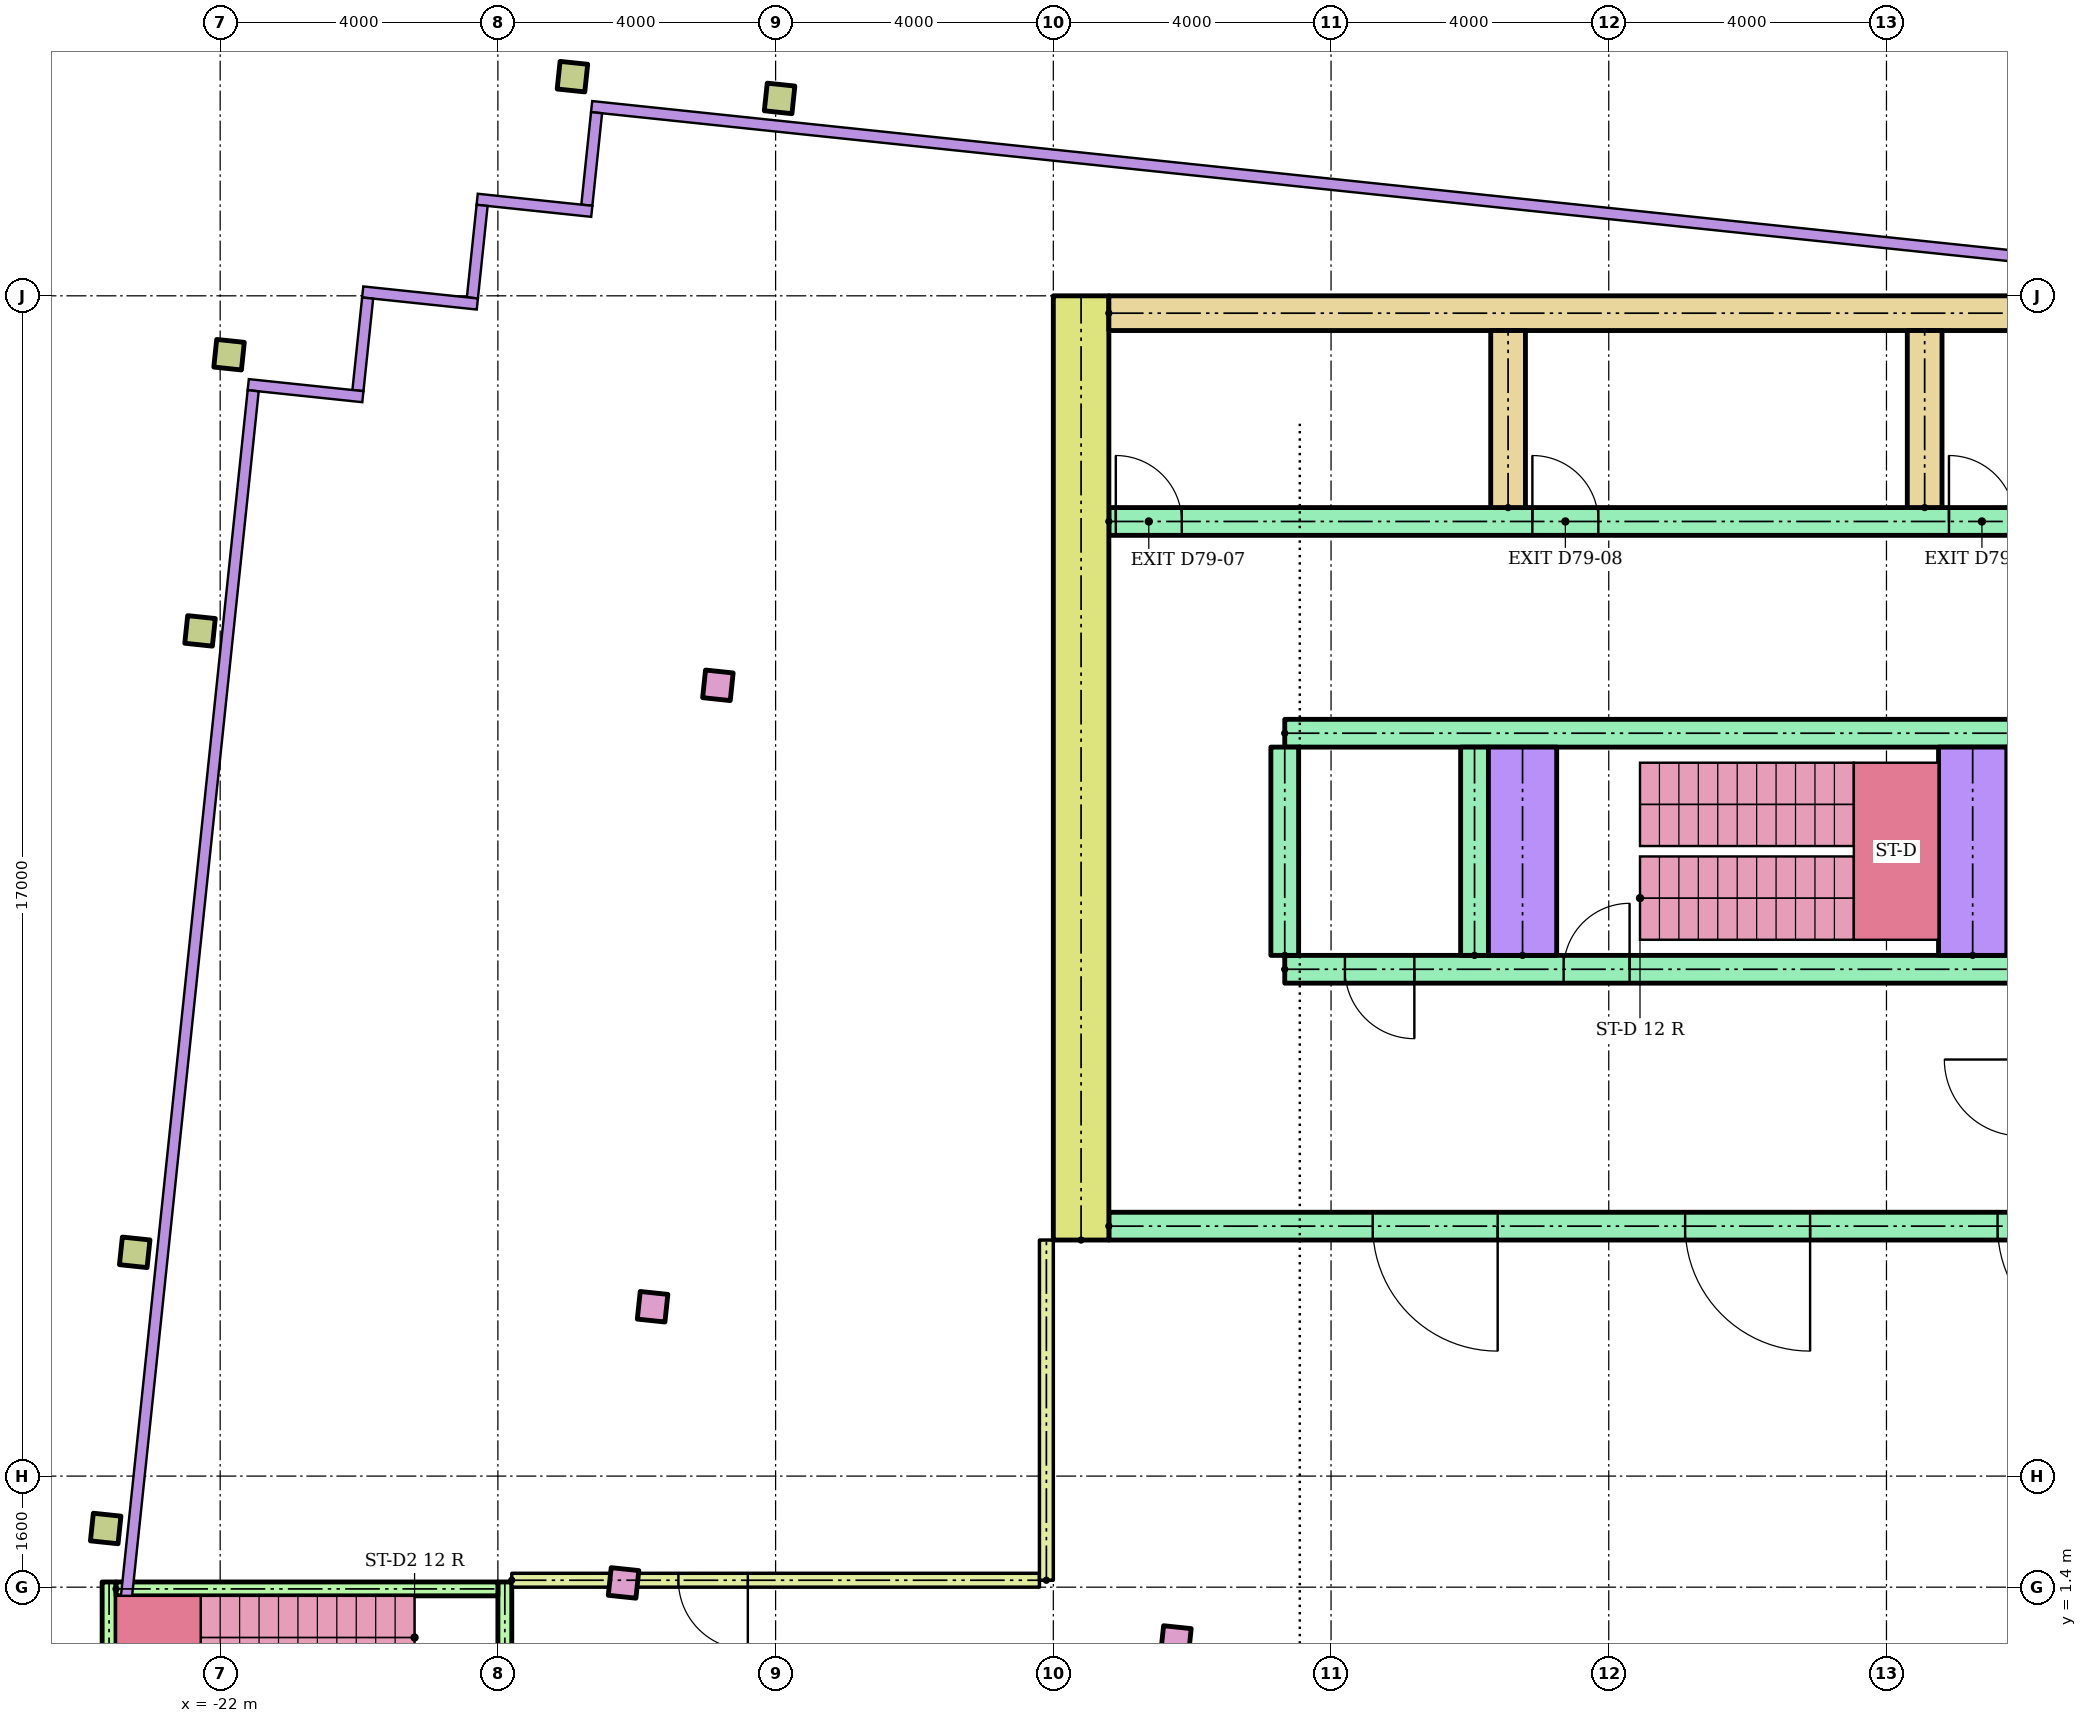
"""IFC4 building model, lengths in metres.
Left out: names, types, materials, properties, quantities, classifications, styles, units other than length and angle.
Written with IfcOpenShell. Run it as: python <this file> out.ifc"""

import sys

from ifc_helpers import new_model, si_unit, direction, frame, frame_2d, origin, origin_2d, place, context, subcontext, project, spatial, rectangle, hollow_rectangle, extrude, element, fill, save


model = new_model("IFC4")
c1 = context("Model", 3, precision=1e-05, world=origin(), true_north=direction((0.0, 1.0)))
c2 = subcontext(c1, "Body", "Model", "MODEL_VIEW")
j1 = project(units=[si_unit("LENGTHUNIT", "METRE"), si_unit("PLANEANGLEUNIT", "RADIAN")], contexts=[c1])
p1 = place(None, origin())
s1 = spatial("IfcSite", under=j1, at=p1, CompositionType="ELEMENT")
p2 = place(p1, origin())
s2 = spatial("IfcBuilding", under=s1, at=p2, CompositionType="ELEMENT")
p3 = place(p2, frame((0.0, 0.0, 309.2)))
s3 = spatial("IfcBuildingStorey", under=s2, at=p3, CompositionType="ELEMENT", Elevation=309.2)
p4 = place(p3, frame((-23.649, 2.245, 0.0), z_axis=(0.0, 0.0, 1.0), x_axis=(0.994521895368, -0.104528463268, 0.0)))
e1 = element("IfcColumn", 1, at=p4, inside=s3, PredefinedType="COLUMN", context=c2, shape_type="SweptSolid", body=[
    extrude(hollow_rectangle(XDim=0.4, YDim=0.4, WallThickness=0.02, at=origin_2d()), origin(), (0.0, 0.0, 1.0), 3.78),
])
for number, where, z_axis, x_axis in (
    (2, (-16.19, 1.461, 0.0), (0.0, 0.0, 1.0), (0.995, -0.105, 0.0)),
    (3, (-8.234, 0.625, 0.0), (0.0, 0.0, 1.0), (0.995, -0.105, 0.0)),
):
    element("IfcColumn", number, at=place(p3, frame(where, z_axis=z_axis, x_axis=x_axis)), inside=s3, PredefinedType="COLUMN", context=c2, shape_type="SweptSolid", body=[
        extrude(rectangle(XDim=0.4, YDim=0.4, at=origin_2d()), origin(), (0.0, 0.0, 1.0), 3.78),
    ])
p5 = place(p3, frame((-23.231, 6.223, 0.0), z_axis=(0.0, 0.0, 1.0), x_axis=(0.994521895368, -0.104528463268, 0.0)))
e4 = element("IfcColumn", 4, at=p5, inside=s3, PredefinedType="COLUMN", context=c2, shape_type="SweptSolid", body=[
    extrude(hollow_rectangle(XDim=0.4, YDim=0.4, WallThickness=0.02, at=origin_2d()), origin(), (0.0, 0.0, 1.0), 3.78),
])
p6 = place(p3, frame((-15.772, 5.439, 0.0), z_axis=(0.0, 0.0, 1.0), x_axis=(0.994521895368, -0.104528463268, 0.0)))
e5 = element("IfcColumn", 5, at=p6, inside=s3, PredefinedType="COLUMN", context=c2, shape_type="SweptSolid", body=[
    extrude(rectangle(XDim=0.4, YDim=0.4, at=origin_2d()), origin(), (0.0, 0.0, 1.0), 3.78),
])
p7 = place(p3, frame((-22.29, 15.174, 0.0), z_axis=(0.0, 0.0, 1.0), x_axis=(0.994521895368, -0.104528463268, 0.0)))
e6 = element("IfcColumn", 6, at=p7, inside=s3, PredefinedType="COLUMN", context=c2, shape_type="SweptSolid", body=[
    extrude(hollow_rectangle(XDim=0.4, YDim=0.4, WallThickness=0.02, at=origin_2d()), origin(), (0.0, 0.0, 1.0), 3.78),
])
p8 = place(p3, frame((-14.831, 14.39, 0.0), z_axis=(0.0, 0.0, 1.0), x_axis=(0.994521895368, -0.104528463268, 0.0)))
e7 = element("IfcColumn", 7, at=p8, inside=s3, PredefinedType="COLUMN", context=c2, shape_type="SweptSolid", body=[
    extrude(rectangle(XDim=0.4, YDim=0.4, at=origin_2d()), origin(), (0.0, 0.0, 1.0), 3.78),
])
for number, where, z_axis, x_axis in (
    (8, (-21.872, 19.152, 0.0), (0.0, 0.0, 1.0), (0.995, -0.105, 0.0)),
    (9, (-16.926, 23.157, 0.0), (0.0, 0.0, 1.0), (0.995, -0.105, 0.0)),
    (10, (-13.943, 22.843, 0.0), (0.0, 0.0, 1.0), (0.995, -0.105, 0.0)),
):
    element("IfcColumn", number, at=place(p3, frame(where, z_axis=z_axis, x_axis=x_axis)), inside=s3, PredefinedType="COLUMN", context=c2, shape_type="SweptSolid", body=[
        extrude(hollow_rectangle(XDim=0.4, YDim=0.4, WallThickness=0.02, at=origin_2d()), origin(), (0.0, 0.0, 1.0), 3.78),
    ])
p9 = place(p3, frame((-9.6, 6.4, 0.0), z_axis=(0.0, 0.0, 1.0), x_axis=(0.0, 1.0, 0.0)))
e11 = element("IfcWall", 11, at=p9, inside=s3, PredefinedType="SHEAR", context=c2, shape_type="SweptSolid", body=[
    extrude(rectangle(XDim=13.6, YDim=0.8, at=frame_2d((6.8, 0.0))), origin(), (0.0, 0.0, 1.0), 3.78),
])
p10 = place(p3, frame((-9.2, 19.75, 0.0)))
e12 = element("IfcWall", 12, at=p10, inside=s3, PredefinedType="SHEAR", context=c2, shape_type="SweptSolid", body=[
    extrude(rectangle(XDim=18.4, YDim=0.5, at=frame_2d((9.2, 0.0))), origin(), (0.0, 0.0, 1.0), 3.78),
])
p11 = place(p3, frame((-9.2, 6.6, 0.0)))
e13 = element("IfcWall", 13, at=p11, inside=s3, PredefinedType="SHEAR", context=c2, shape_type="SweptSolid", body=[
    extrude(rectangle(XDim=18.4, YDim=0.4, at=frame_2d((9.2, 0.0))), origin(), (0.0, 0.0, 1.0), 3.78),
])
p12 = place(p11, frame((8.3, 0.0, 0.0)))
e14 = element("IfcOpeningElement", 14, at=p12, cuts=e13, PredefinedType="OPENING", context=c2, shape_type="SweptSolid", body=[
    extrude(rectangle(XDim=1.8, YDim=2.1, at=frame_2d((0.9, 1.05))), frame((0.0, 0.21, 0.0), z_axis=(0.0, -1.0, 0.0), x_axis=(1.0, 0.0, 0.0)), (0.0, 0.0, 1.0), 0.42),
])
p13 = place(p11, frame((3.8, 0.0, 0.0)))
e15 = element("IfcOpeningElement", 15, at=p13, cuts=e13, PredefinedType="OPENING", context=c2, shape_type="SweptSolid", body=[
    extrude(rectangle(XDim=1.8, YDim=2.1, at=frame_2d((0.9, 1.05))), frame((0.0, 0.21, 0.0), z_axis=(0.0, -1.0, 0.0), x_axis=(1.0, 0.0, 0.0)), (0.0, 0.0, 1.0), 0.42),
])
p14 = place(p11, frame((12.8, 0.0, 0.0)))
e16 = element("IfcOpeningElement", 16, at=p14, cuts=e13, PredefinedType="OPENING", context=c2, shape_type="SweptSolid", body=[
    extrude(rectangle(XDim=1.8, YDim=2.1, at=frame_2d((0.9, 1.05))), frame((0.0, 0.21, 0.0), z_axis=(0.0, -1.0, 0.0), x_axis=(1.0, 0.0, 0.0)), (0.0, 0.0, 1.0), 0.42),
])
p15 = place(p3, frame((-6.667, 10.3, 0.0)))
e17 = element("IfcWall", 17, at=p15, inside=s3, PredefinedType="SHEAR", context=c2, shape_type="SweptSolid", body=[
    extrude(rectangle(XDim=15.867, YDim=0.4, at=frame_2d((7.933, 0.0))), origin(), (0.0, 0.0, 1.0), 3.78),
])
p16 = place(p15, frame((11.417, 0.0, 0.0)))
e18 = element("IfcOpeningElement", 18, at=p16, cuts=e17, PredefinedType="OPENING", context=c2, shape_type="SweptSolid", body=[
    extrude(rectangle(XDim=1.1, YDim=2.1, at=frame_2d((0.55, 1.05))), frame((0.0, 0.21, 0.0), z_axis=(0.0, -1.0, 0.0), x_axis=(1.0, 0.0, 0.0)), (0.0, 0.0, 1.0), 0.42),
])
p17 = place(p15, frame((14.15, 0.0, 0.0)))
e19 = element("IfcOpeningElement", 19, at=p17, cuts=e17, PredefinedType="OPENING", context=c2, shape_type="SweptSolid", body=[
    extrude(rectangle(XDim=1.1, YDim=2.1, at=frame_2d((0.55, 1.05))), frame((0.0, 0.21, 0.0), z_axis=(0.0, -1.0, 0.0), x_axis=(1.0, 0.0, 0.0)), (0.0, 0.0, 1.0), 0.42),
])
p18 = place(p15, frame((0.867, 0.0, 0.0)))
e20 = element("IfcOpeningElement", 20, at=p18, cuts=e17, PredefinedType="OPENING", context=c2, shape_type="SweptSolid", body=[
    extrude(rectangle(XDim=1.0, YDim=2.1, at=frame_2d((0.5, 1.05))), frame((0.0, 0.21, 0.0), z_axis=(0.0, -1.0, 0.0), x_axis=(1.0, 0.0, 0.0)), (0.0, 0.0, 1.0), 0.42),
])
p19 = place(p15, frame((4.017, 0.0, 0.0)))
e21 = element("IfcOpeningElement", 21, at=p19, cuts=e17, PredefinedType="OPENING", context=c2, shape_type="SweptSolid", body=[
    extrude(rectangle(XDim=0.95, YDim=2.1, at=frame_2d((0.475, 1.05))), frame((0.0, 0.21, 0.0), z_axis=(0.0, -1.0, 0.0), x_axis=(1.0, 0.0, 0.0)), (0.0, 0.0, 1.0), 0.42),
])
p20 = place(p3, frame((-6.667, 13.7, 0.0)))
e22 = element("IfcWall", 22, at=p20, inside=s3, PredefinedType="SHEAR", context=c2, shape_type="SweptSolid", body=[
    extrude(rectangle(XDim=15.867, YDim=0.4, at=frame_2d((7.933, 0.0))), origin(), (0.0, 0.0, 1.0), 3.78),
])
for number, where, z_axis, x_axis in (
    (23, (-6.667, 10.5, 0.0), (0.0, 0.0, 1.0), (0.0, 1.0, 0.0)),
    (24, (-3.933, 10.5, 0.0), (0.0, 0.0, 1.0), (0.0, 1.0, 0.0)),
    (25, (3.933, 10.5, 0.0), (0.0, 0.0, 1.0), (0.0, 1.0, 0.0)),
):
    element("IfcWall", number, at=place(p3, frame(where, z_axis=z_axis, x_axis=x_axis)), inside=s3, PredefinedType="SHEAR", context=c2, shape_type="SweptSolid", body=[
        extrude(rectangle(XDim=3.0, YDim=0.4, at=frame_2d((1.5, 0.0))), origin(), (0.0, 0.0, 1.0), 3.78),
    ])
for number, where, z_axis, x_axis in (
    (26, (-3.242, 10.5, 0.0), (0.0, 0.0, 1.0), (0.0, 1.0, 0.0)),
    (27, (3.242, 10.5, 0.0), (0.0, 0.0, 1.0), (0.0, 1.0, 0.0)),
):
    element("IfcWall", number, at=place(p3, frame(where, z_axis=z_axis, x_axis=x_axis)), inside=s3, PredefinedType="SHEAR", context=c2, shape_type="SweptSolid", body=[
        extrude(rectangle(XDim=3.0, YDim=0.983, at=frame_2d((1.5, 0.0))), origin(), (0.0, 0.0, 1.0), 3.78),
    ])
p21 = place(p3, frame((-9.2, 16.75, 0.0)))
e28 = element("IfcWall", 28, at=p21, inside=s3, PredefinedType="SHEAR", context=c2, shape_type="SweptSolid", body=[
    extrude(rectangle(XDim=18.4, YDim=0.4, at=frame_2d((9.2, 0.0))), origin(), (0.0, 0.0, 1.0), 3.78),
])
p22 = place(p21, frame((0.1, 0.0, 0.0)))
e29 = element("IfcOpeningElement", 29, at=p22, cuts=e28, PredefinedType="OPENING", context=c2, shape_type="SweptSolid", body=[
    extrude(rectangle(XDim=0.95, YDim=2.1, at=frame_2d((0.475, 1.05))), frame((0.0, 0.21, 0.0), z_axis=(0.0, -1.0, 0.0), x_axis=(1.0, 0.0, 0.0)), (0.0, 0.0, 1.0), 0.42),
])
p23 = place(p21, frame((6.1, 0.0, 0.0)))
e30 = element("IfcOpeningElement", 30, at=p23, cuts=e28, PredefinedType="OPENING", context=c2, shape_type="SweptSolid", body=[
    extrude(rectangle(XDim=0.95, YDim=2.1, at=frame_2d((0.475, 1.05))), frame((0.0, 0.21, 0.0), z_axis=(0.0, -1.0, 0.0), x_axis=(1.0, 0.0, 0.0)), (0.0, 0.0, 1.0), 0.42),
])
p24 = place(p21, frame((12.1, 0.0, 0.0)))
e31 = element("IfcOpeningElement", 31, at=p24, cuts=e28, PredefinedType="OPENING", context=c2, shape_type="SweptSolid", body=[
    extrude(rectangle(XDim=0.95, YDim=2.1, at=frame_2d((0.475, 1.05))), frame((0.0, 0.21, 0.0), z_axis=(0.0, -1.0, 0.0), x_axis=(1.0, 0.0, 0.0)), (0.0, 0.0, 1.0), 0.42),
])
for number, where, z_axis, x_axis in (
    (32, (-3.45, 16.95, 0.0), (0.0, 0.0, 1.0), (0.0, 1.0, 0.0)),
    (33, (2.55, 16.95, 0.0), (0.0, 0.0, 1.0), (0.0, 1.0, 0.0)),
):
    element("IfcWall", number, at=place(p3, frame(where, z_axis=z_axis, x_axis=x_axis)), inside=s3, PredefinedType="SHEAR", context=c2, shape_type="SweptSolid", body=[
        extrude(rectangle(XDim=2.55, YDim=0.5, at=frame_2d((1.275, 0.0))), origin(), (0.0, 0.0, 1.0), 3.78),
    ])
p25 = place(p3, frame((-17.8, 1.5, 0.0)))
e34 = element("IfcWall", 34, at=p25, inside=s3, PredefinedType="PARTITIONING", context=c2, shape_type="SweptSolid", body=[
    extrude(rectangle(XDim=7.6, YDim=0.2, at=frame_2d((3.8, 0.0))), origin(), (0.0, 0.0, 1.0), 3.78),
])
p26 = place(p25, frame((2.4, 0.0, 0.0)))
e35 = element("IfcOpeningElement", 35, at=p26, cuts=e34, PredefinedType="OPENING", context=c2, shape_type="SweptSolid", body=[
    extrude(rectangle(XDim=1.0, YDim=2.4, at=frame_2d((0.5, 1.2))), frame((0.0, 0.11, 0.0), z_axis=(0.0, -1.0, 0.0), x_axis=(1.0, 0.0, 0.0)), (0.0, 0.0, 1.0), 0.22),
])
p27 = place(p3, frame((-10.1, 1.5, 0.0), z_axis=(0.0, 0.0, 1.0), x_axis=(0.0, 1.0, 0.0)))
e36 = element("IfcWall", 36, at=p27, inside=s3, PredefinedType="PARTITIONING", context=c2, shape_type="SweptSolid", body=[
    extrude(rectangle(XDim=4.9, YDim=0.2, at=frame_2d((2.45, 0.0))), origin(), (0.0, 0.0, 1.0), 3.78),
])
p28 = place(p3, frame((-17.9, -1.475, 0.0), z_axis=(0.0, 0.0, 1.0), x_axis=(0.0, 1.0, 0.0)))
e37 = element("IfcWall", 37, at=p28, inside=s3, PredefinedType="SHEAR", context=c2, shape_type="SweptSolid", body=[
    extrude(rectangle(XDim=2.95, YDim=0.2, at=frame_2d((1.475, 0.0))), origin(), (0.0, 0.0, 1.0), 3.78),
])
p29 = place(p28, frame((1.0, 0.0, 0.0)))
e38 = element("IfcOpeningElement", 38, at=p29, cuts=e37, PredefinedType="OPENING", context=c2, shape_type="SweptSolid", body=[
    extrude(rectangle(XDim=0.95, YDim=2.1, at=frame_2d((0.475, 1.05))), frame((0.0, 0.11, 0.0), z_axis=(0.0, -1.0, 0.0), x_axis=(1.0, 0.0, 0.0)), (0.0, 0.0, 1.0), 0.22),
])
p30 = place(p3, frame((-23.6, -1.475, 0.0), z_axis=(0.0, 0.0, 1.0), x_axis=(0.0, 1.0, 0.0)))
e39 = element("IfcWall", 39, at=p30, inside=s3, PredefinedType="SHEAR", context=c2, shape_type="SweptSolid", body=[
    extrude(rectangle(XDim=2.95, YDim=0.2, at=frame_2d((1.475, 0.0))), origin(), (0.0, 0.0, 1.0), 3.78),
])
p31 = place(p3, frame((-23.5, 1.375, 0.0)))
e40 = element("IfcWall", 40, at=p31, inside=s3, PredefinedType="SHEAR", context=c2, shape_type="SweptSolid", body=[
    extrude(rectangle(XDim=5.5, YDim=0.2, at=frame_2d((2.75, 0.0))), origin(), (0.0, 0.0, 1.0), 3.78),
])
p32 = place(p12, frame((1.8, 0.0, 0.0), z_axis=(0.0, 0.0, 1.0), x_axis=(-1.0, 0.0, 0.0)))
e41 = element("IfcDoor", 41, at=p32, inside=s3, OperationType="DOUBLE_DOOR_SINGLE_SWING", PredefinedType="DOOR", context=c2, shape_type="SweptSolid", body=[
    extrude(rectangle(XDim=1.8, YDim=2.1, at=frame_2d((0.9, 1.05))), frame((0.0, 0.025, 0.0), z_axis=(0.0, -1.0, 0.0), x_axis=(1.0, 0.0, 0.0)), (0.0, 0.0, 1.0), 0.05),
])
fill(e14, e41)
p33 = place(p13, frame((1.8, 0.0, 0.0), z_axis=(0.0, 0.0, 1.0), x_axis=(-1.0, 0.0, 0.0)))
e42 = element("IfcDoor", 42, at=p33, inside=s3, OperationType="DOUBLE_DOOR_SINGLE_SWING", PredefinedType="DOOR", context=c2, shape_type="SweptSolid", body=[
    extrude(rectangle(XDim=1.8, YDim=2.1, at=frame_2d((0.9, 1.05))), frame((0.0, 0.025, 0.0), z_axis=(0.0, -1.0, 0.0), x_axis=(1.0, 0.0, 0.0)), (0.0, 0.0, 1.0), 0.05),
])
fill(e15, e42)
p34 = place(p14, frame((1.8, 0.0, 0.0), z_axis=(0.0, 0.0, 1.0), x_axis=(-1.0, 0.0, 0.0)))
e43 = element("IfcDoor", 43, at=p34, inside=s3, OperationType="DOUBLE_DOOR_SINGLE_SWING", PredefinedType="DOOR", context=c2, shape_type="SweptSolid", body=[
    extrude(rectangle(XDim=1.8, YDim=2.1, at=frame_2d((0.9, 1.05))), frame((0.0, 0.025, 0.0), z_axis=(0.0, -1.0, 0.0), x_axis=(1.0, 0.0, 0.0)), (0.0, 0.0, 1.0), 0.05),
])
fill(e16, e43)
p35 = place(p18, frame((1.0, 0.0, 0.0), z_axis=(0.0, 0.0, 1.0), x_axis=(-1.0, 0.0, 0.0)))
e44 = element("IfcDoor", 44, at=p35, inside=s3, OperationType="SINGLE_SWING_RIGHT", PredefinedType="DOOR", context=c2, shape_type="SweptSolid", body=[
    extrude(rectangle(XDim=1.0, YDim=2.1, at=frame_2d((0.5, 1.05))), frame((0.0, 0.025, 0.0), z_axis=(0.0, -1.0, 0.0), x_axis=(1.0, 0.0, 0.0)), (0.0, 0.0, 1.0), 0.05),
])
fill(e20, e44)
p36 = place(p19, origin())
e45 = element("IfcDoor", 45, at=p36, inside=s3, OperationType="SINGLE_SWING_RIGHT", PredefinedType="DOOR", context=c2, shape_type="SweptSolid", body=[
    extrude(rectangle(XDim=0.95, YDim=2.1, at=frame_2d((0.475, 1.05))), frame((0.0, 0.025, 0.0), z_axis=(0.0, -1.0, 0.0), x_axis=(1.0, 0.0, 0.0)), (0.0, 0.0, 1.0), 0.05),
])
fill(e21, e45)
p37 = place(p22, origin())
e46 = element("IfcDoor", 46, at=p37, inside=s3, OperationType="SINGLE_SWING_LEFT", PredefinedType="DOOR", context=c2, shape_type="SweptSolid", body=[
    extrude(rectangle(XDim=0.95, YDim=2.1, at=frame_2d((0.475, 1.05))), frame((0.0, 0.025, 0.0), z_axis=(0.0, -1.0, 0.0), x_axis=(1.0, 0.0, 0.0)), (0.0, 0.0, 1.0), 0.05),
])
fill(e29, e46)
p38 = place(p23, origin())
e47 = element("IfcDoor", 47, at=p38, inside=s3, OperationType="SINGLE_SWING_LEFT", PredefinedType="DOOR", context=c2, shape_type="SweptSolid", body=[
    extrude(rectangle(XDim=0.95, YDim=2.1, at=frame_2d((0.475, 1.05))), frame((0.0, 0.025, 0.0), z_axis=(0.0, -1.0, 0.0), x_axis=(1.0, 0.0, 0.0)), (0.0, 0.0, 1.0), 0.05),
])
fill(e30, e47)
p39 = place(p24, origin())
e48 = element("IfcDoor", 48, at=p39, inside=s3, OperationType="SINGLE_SWING_LEFT", PredefinedType="DOOR", context=c2, shape_type="SweptSolid", body=[
    extrude(rectangle(XDim=0.95, YDim=2.1, at=frame_2d((0.475, 1.05))), frame((0.0, 0.025, 0.0), z_axis=(0.0, -1.0, 0.0), x_axis=(1.0, 0.0, 0.0)), (0.0, 0.0, 1.0), 0.05),
])
fill(e31, e48)
p40 = place(p26, frame((1.0, 0.0, 0.0), z_axis=(0.0, 0.0, 1.0), x_axis=(-1.0, 0.0, 0.0)))
e49 = element("IfcDoor", 49, at=p40, inside=s3, OperationType="SINGLE_SWING_RIGHT", PredefinedType="DOOR", context=c2, shape_type="SweptSolid", body=[
    extrude(rectangle(XDim=1.0, YDim=2.4, at=frame_2d((0.5, 1.2))), frame((0.0, 0.025, 0.0), z_axis=(0.0, -1.0, 0.0), x_axis=(1.0, 0.0, 0.0)), (0.0, 0.0, 1.0), 0.05),
])
fill(e35, e49)
save(model, sys.argv[1])
